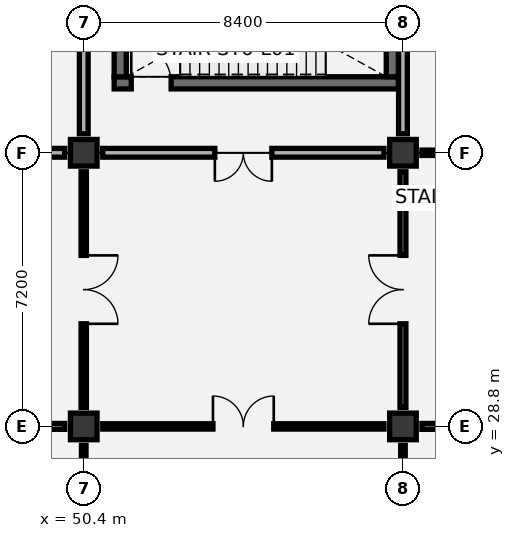
"""IFC4 building model, lengths in metres.
Left out: names, types, materials, properties, quantities, classifications, styles, units other than length and angle.
Written with IfcOpenShell. Run it as: python <this file> out.ifc"""

import sys

from ifc_helpers import new_model, si_unit, direction, frame, frame_2d, origin, origin_2d, place, context, subcontext, project, spatial, rectangle, extrude, element, fill, save


model = new_model("IFC4")
c1 = context("Model", 3, precision=1e-05, world=origin(), true_north=direction((0.0, 1.0)))
c2 = subcontext(c1, "Body", "Model", "MODEL_VIEW")
j1 = project(units=[si_unit("LENGTHUNIT", "METRE"), si_unit("PLANEANGLEUNIT", "RADIAN")], contexts=[c1])
p1 = place(None, origin())
s1 = spatial("IfcSite", under=j1, at=p1, CompositionType="ELEMENT")
p2 = place(p1, origin())
s2 = spatial("IfcBuilding", under=s1, at=p2, CompositionType="ELEMENT")
p3 = place(p2, frame((0.0, 0.0, 6.0)))
s3 = spatial("IfcBuildingStorey", under=s2, at=p3, CompositionType="ELEMENT", Elevation=6.0)
for number, where, z_axis, x_axis in (
    (1, (50.4, 28.8, 0.0), (0.0, 0.0, 1.0), (1.0, 0.0, 0.0)),
    (2, (50.4, 36.0, 0.0), (0.0, 0.0, 1.0), (1.0, 0.0, 0.0)),
    (3, (58.8, 28.8, 0.0), (0.0, 0.0, 1.0), (1.0, 0.0, 0.0)),
    (4, (58.8, 36.0, 0.0), (0.0, 0.0, 1.0), (1.0, 0.0, 0.0)),
):
    element("IfcColumn", number, at=place(p3, frame(where, z_axis=z_axis, x_axis=x_axis)), inside=s3, PredefinedType="COLUMN", context=c2, shape_type="SweptSolid", body=[
        extrude(rectangle(XDim=0.7, YDim=0.7, at=origin_2d()), origin(), (0.0, 0.0, 1.0), 5.4),
    ])
p4 = place(p3, frame((51.2, 37.84, 0.0), z_axis=(0.0, 0.0, 1.0), x_axis=(1.0, 0.0, 0.0)))
e5 = element("IfcWall", 5, at=p4, inside=s3, PredefinedType="SHEAR", context=c2, shape_type="SweptSolid", body=[
    extrude(rectangle(XDim=7.48, YDim=0.32, at=frame_2d((3.74, 0.0))), origin(), (0.0, 0.0, 1.0), 5.075),
])
p5 = place(p4, frame((0.45, 0.0, 0.0)))
e6 = element("IfcOpeningElement", 6, at=p5, cuts=e5, PredefinedType="OPENING", context=c2, shape_type="SweptSolid", body=[
    extrude(rectangle(XDim=1.05, YDim=2.15, at=frame_2d((0.525, 1.075))), frame((0.0, 0.17, 0.0), z_axis=(0.0, -1.0, 0.0), x_axis=(1.0, 0.0, 0.0)), (0.0, 0.0, 1.0), 0.34),
])
for number, where, z_axis, x_axis in (
    (7, (51.36, 38.0, 0.0), (0.0, 0.0, 1.0), (0.0, 1.0, 0.0)),
    (8, (58.52, 38.0, 0.0), (0.0, 0.0, 1.0), (0.0, 1.0, 0.0)),
):
    element("IfcWall", number, at=place(p3, frame(where, z_axis=z_axis, x_axis=x_axis)), inside=s3, PredefinedType="SHEAR", context=c2, shape_type="SweptSolid", body=[
        extrude(rectangle(XDim=3.8, YDim=0.32, at=frame_2d((1.9, 0.0))), origin(), (0.0, 0.0, 1.0), 5.075),
    ])
p6 = place(p3, frame((50.4, 22.1, 0.0), z_axis=(0.0, 0.0, 1.0), x_axis=(0.0, 1.0, 0.0)))
e9 = element("IfcWall", 9, at=p6, inside=s3, PredefinedType="PARTITIONING", context=c2, shape_type="SweptSolid", body=[
    extrude(rectangle(XDim=6.2, YDim=0.12, at=frame_2d((3.1, 0.0))), origin(), (0.0, 0.0, 1.0), 4.57),
])
p7 = place(p3, frame((42.5, 28.8, 0.0), z_axis=(0.0, 0.0, 1.0), x_axis=(1.0, 0.0, 0.0)))
e10 = element("IfcWall", 10, at=p7, inside=s3, PredefinedType="PARTITIONING", context=c2, shape_type="SweptSolid", body=[
    extrude(rectangle(XDim=7.4, YDim=0.155, at=frame_2d((3.7, 0.0))), origin(), (0.0, 0.0, 1.0), 4.27),
])
p8 = place(p7, frame((2.9, 0.0, 0.0)))
e11 = element("IfcOpeningElement", 11, at=p8, cuts=e10, PredefinedType="OPENING", context=c2, shape_type="SweptSolid", body=[
    extrude(rectangle(XDim=1.6, YDim=2.2, at=frame_2d((0.8, 1.1))), frame((0.0, 0.087, 0.0), z_axis=(0.0, -1.0, 0.0), x_axis=(1.0, 0.0, 0.0)), (0.0, 0.0, 1.0), 0.175),
])
p9 = place(p3, frame((50.4, 29.3, 0.0), z_axis=(0.0, 0.0, 1.0), x_axis=(0.0, 1.0, 0.0)))
e12 = element("IfcWall", 12, at=p9, inside=s3, PredefinedType="PARTITIONING", context=c2, shape_type="SweptSolid", body=[
    extrude(rectangle(XDim=6.2, YDim=0.14, at=frame_2d((3.1, 0.0))), origin(), (0.0, 0.0, 1.0), 4.32),
])
p10 = place(p9, frame((2.2, 0.0, 0.0)))
e13 = element("IfcOpeningElement", 13, at=p10, cuts=e12, PredefinedType="OPENING", context=c2, shape_type="SweptSolid", body=[
    extrude(rectangle(XDim=1.8, YDim=2.25, at=frame_2d((0.9, 1.125))), frame((0.0, 0.08, 0.0), z_axis=(0.0, -1.0, 0.0), x_axis=(1.0, 0.0, 0.0)), (0.0, 0.0, 1.0), 0.16),
])
p11 = place(p3, frame((42.5, 36.0, 0.0), z_axis=(0.0, 0.0, 1.0), x_axis=(1.0, 0.0, 0.0)))
e14 = element("IfcWall", 14, at=p11, inside=s3, PredefinedType="PARTITIONING", context=c2, shape_type="SweptSolid", body=[
    extrude(rectangle(XDim=7.4, YDim=0.23, at=frame_2d((3.7, 0.0))), origin(), (0.0, 0.0, 1.0), 4.27),
])
p12 = place(p11, frame((2.95, 0.0, 0.0)))
e15 = element("IfcOpeningElement", 15, at=p12, cuts=e14, PredefinedType="OPENING", context=c2, shape_type="SweptSolid", body=[
    extrude(rectangle(XDim=1.5, YDim=2.15, at=frame_2d((0.75, 1.075))), frame((0.0, 0.125, 0.0), z_axis=(0.0, -1.0, 0.0), x_axis=(1.0, 0.0, 0.0)), (0.0, 0.0, 1.0), 0.25),
])
p13 = place(p3, frame((50.4, 36.5, 0.0), z_axis=(0.0, 0.0, 1.0), x_axis=(0.0, 1.0, 0.0)))
e16 = element("IfcWall", 16, at=p13, inside=s3, PredefinedType="PARTITIONING", context=c2, shape_type="SweptSolid", body=[
    extrude(rectangle(XDim=6.2, YDim=0.23, at=frame_2d((3.1, 0.0))), origin(), (0.0, 0.0, 1.0), 4.67),
])
p14 = place(p3, frame((58.8, 22.1, 0.0), z_axis=(0.0, 0.0, 1.0), x_axis=(0.0, 1.0, 0.0)))
e17 = element("IfcWall", 17, at=p14, inside=s3, PredefinedType="PARTITIONING", context=c2, shape_type="SweptSolid", body=[
    extrude(rectangle(XDim=6.2, YDim=0.12, at=frame_2d((3.1, 0.0))), origin(), (0.0, 0.0, 1.0), 4.32),
])
p15 = place(p3, frame((50.9, 28.8, 0.0), z_axis=(0.0, 0.0, 1.0), x_axis=(1.0, 0.0, 0.0)))
e18 = element("IfcWall", 18, at=p15, inside=s3, PredefinedType="PARTITIONING", context=c2, shape_type="SweptSolid", body=[
    extrude(rectangle(XDim=7.4, YDim=0.14, at=frame_2d((3.7, 0.0))), origin(), (0.0, 0.0, 1.0), 4.27),
])
p16 = place(p15, frame((2.9, 0.0, 0.0)))
e19 = element("IfcOpeningElement", 19, at=p16, cuts=e18, PredefinedType="OPENING", context=c2, shape_type="SweptSolid", body=[
    extrude(rectangle(XDim=1.6, YDim=2.2, at=frame_2d((0.8, 1.1))), frame((0.0, 0.08, 0.0), z_axis=(0.0, -1.0, 0.0), x_axis=(1.0, 0.0, 0.0)), (0.0, 0.0, 1.0), 0.16),
])
p17 = place(p3, frame((58.8, 29.3, 0.0), z_axis=(0.0, 0.0, 1.0), x_axis=(0.0, 1.0, 0.0)))
e20 = element("IfcWall", 20, at=p17, inside=s3, PredefinedType="PARTITIONING", context=c2, shape_type="SweptSolid", body=[
    extrude(rectangle(XDim=6.2, YDim=0.155, at=frame_2d((3.1, 0.0))), origin(), (0.0, 0.0, 1.0), 4.67),
])
p18 = place(p17, frame((2.2, 0.0, 0.0)))
e21 = element("IfcOpeningElement", 21, at=p18, cuts=e20, PredefinedType="OPENING", context=c2, shape_type="SweptSolid", body=[
    extrude(rectangle(XDim=1.8, YDim=2.25, at=frame_2d((0.9, 1.125))), frame((0.0, 0.087, 0.0), z_axis=(0.0, -1.0, 0.0), x_axis=(1.0, 0.0, 0.0)), (0.0, 0.0, 1.0), 0.175),
])
p19 = place(p3, frame((50.9, 36.0, 0.0), z_axis=(0.0, 0.0, 1.0), x_axis=(1.0, 0.0, 0.0)))
e22 = element("IfcWall", 22, at=p19, inside=s3, PredefinedType="PARTITIONING", context=c2, shape_type="SweptSolid", body=[
    extrude(rectangle(XDim=7.4, YDim=0.23, at=frame_2d((3.7, 0.0))), origin(), (0.0, 0.0, 1.0), 4.27),
])
p20 = place(p19, frame((2.95, 0.0, 0.0)))
e23 = element("IfcOpeningElement", 23, at=p20, cuts=e22, PredefinedType="OPENING", context=c2, shape_type="SweptSolid", body=[
    extrude(rectangle(XDim=1.5, YDim=2.15, at=frame_2d((0.75, 1.075))), frame((0.0, 0.125, 0.0), z_axis=(0.0, -1.0, 0.0), x_axis=(1.0, 0.0, 0.0)), (0.0, 0.0, 1.0), 0.25),
])
p21 = place(p3, frame((58.8, 36.5, 0.0), z_axis=(0.0, 0.0, 1.0), x_axis=(0.0, 1.0, 0.0)))
e24 = element("IfcWall", 24, at=p21, inside=s3, PredefinedType="PARTITIONING", context=c2, shape_type="SweptSolid", body=[
    extrude(rectangle(XDim=6.2, YDim=0.23, at=frame_2d((3.1, 0.0))), origin(), (0.0, 0.0, 1.0), 4.32),
])
p22 = place(p3, frame((59.3, 28.8, 0.0), z_axis=(0.0, 0.0, 1.0), x_axis=(1.0, 0.0, 0.0)))
e25 = element("IfcWall", 25, at=p22, inside=s3, PredefinedType="PARTITIONING", context=c2, shape_type="SweptSolid", body=[
    extrude(rectangle(XDim=7.4, YDim=0.155, at=frame_2d((3.7, 0.0))), origin(), (0.0, 0.0, 1.0), 4.27),
])
p23 = place(p22, frame((2.9, 0.0, 0.0)))
e26 = element("IfcOpeningElement", 26, at=p23, cuts=e25, PredefinedType="OPENING", context=c2, shape_type="SweptSolid", body=[
    extrude(rectangle(XDim=1.6, YDim=2.2, at=frame_2d((0.8, 1.1))), frame((0.0, 0.087, 0.0), z_axis=(0.0, -1.0, 0.0), x_axis=(1.0, 0.0, 0.0)), (0.0, 0.0, 1.0), 0.175),
])
p24 = place(p3, frame((59.3, 36.0, 0.0), z_axis=(0.0, 0.0, 1.0), x_axis=(1.0, 0.0, 0.0)))
e27 = element("IfcWall", 27, at=p24, inside=s3, PredefinedType="PARTITIONING", context=c2, shape_type="SweptSolid", body=[
    extrude(rectangle(XDim=7.4, YDim=0.14, at=frame_2d((3.7, 0.0))), origin(), (0.0, 0.0, 1.0), 4.27),
])
p25 = place(p24, frame((2.8, 0.0, 0.0)))
e28 = element("IfcOpeningElement", 28, at=p25, cuts=e27, PredefinedType="OPENING", context=c2, shape_type="SweptSolid", body=[
    extrude(rectangle(XDim=1.8, YDim=2.25, at=frame_2d((0.9, 1.125))), frame((0.0, 0.08, 0.0), z_axis=(0.0, -1.0, 0.0), x_axis=(1.0, 0.0, 0.0)), (0.0, 0.0, 1.0), 0.16),
])
p26 = place(p5, origin())
e29 = element("IfcDoor", 29, at=p26, inside=s3, OperationType="SINGLE_SWING_LEFT", PredefinedType="DOOR", context=c2, shape_type="SweptSolid", body=[
    extrude(rectangle(XDim=1.05, YDim=2.15, at=frame_2d((0.525, 1.075))), frame((0.0, 0.025, 0.0), z_axis=(0.0, -1.0, 0.0), x_axis=(1.0, 0.0, 0.0)), (0.0, 0.0, 1.0), 0.05),
])
fill(e6, e29)
p27 = place(p10, frame((1.8, 0.0, 0.0), z_axis=(0.0, 0.0, 1.0), x_axis=(-1.0, 0.0, 0.0)))
e30 = element("IfcDoor", 30, at=p27, inside=s3, OperationType="DOUBLE_DOOR_SINGLE_SWING", PredefinedType="DOOR", context=c2, shape_type="SweptSolid", body=[
    extrude(rectangle(XDim=1.8, YDim=2.25, at=frame_2d((0.9, 1.125))), frame((0.0, 0.025, 0.0), z_axis=(0.0, -1.0, 0.0), x_axis=(1.0, 0.0, 0.0)), (0.0, 0.0, 1.0), 0.05),
])
fill(e13, e30)
p28 = place(p16, origin())
e31 = element("IfcDoor", 31, at=p28, inside=s3, OperationType="DOUBLE_DOOR_SINGLE_SWING", PredefinedType="DOOR", context=c2, shape_type="SweptSolid", body=[
    extrude(rectangle(XDim=1.6, YDim=2.2, at=frame_2d((0.8, 1.1))), frame((0.0, 0.025, 0.0), z_axis=(0.0, -1.0, 0.0), x_axis=(1.0, 0.0, 0.0)), (0.0, 0.0, 1.0), 0.05),
])
fill(e19, e31)
p29 = place(p18, origin())
e32 = element("IfcDoor", 32, at=p29, inside=s3, OperationType="DOUBLE_DOOR_SINGLE_SWING", PredefinedType="DOOR", context=c2, shape_type="SweptSolid", body=[
    extrude(rectangle(XDim=1.8, YDim=2.25, at=frame_2d((0.9, 1.125))), frame((0.0, 0.025, 0.0), z_axis=(0.0, -1.0, 0.0), x_axis=(1.0, 0.0, 0.0)), (0.0, 0.0, 1.0), 0.05),
])
fill(e21, e32)
p30 = place(p20, frame((1.5, 0.0, 0.0), z_axis=(0.0, 0.0, 1.0), x_axis=(-1.0, 0.0, 0.0)))
e33 = element("IfcDoor", 33, at=p30, inside=s3, OperationType="DOUBLE_DOOR_SINGLE_SWING", PredefinedType="DOOR", context=c2, shape_type="SweptSolid", body=[
    extrude(rectangle(XDim=1.5, YDim=2.15, at=frame_2d((0.75, 1.075))), frame((0.0, 0.025, 0.0), z_axis=(0.0, -1.0, 0.0), x_axis=(1.0, 0.0, 0.0)), (0.0, 0.0, 1.0), 0.05),
])
fill(e23, e33)
save(model, sys.argv[1])
